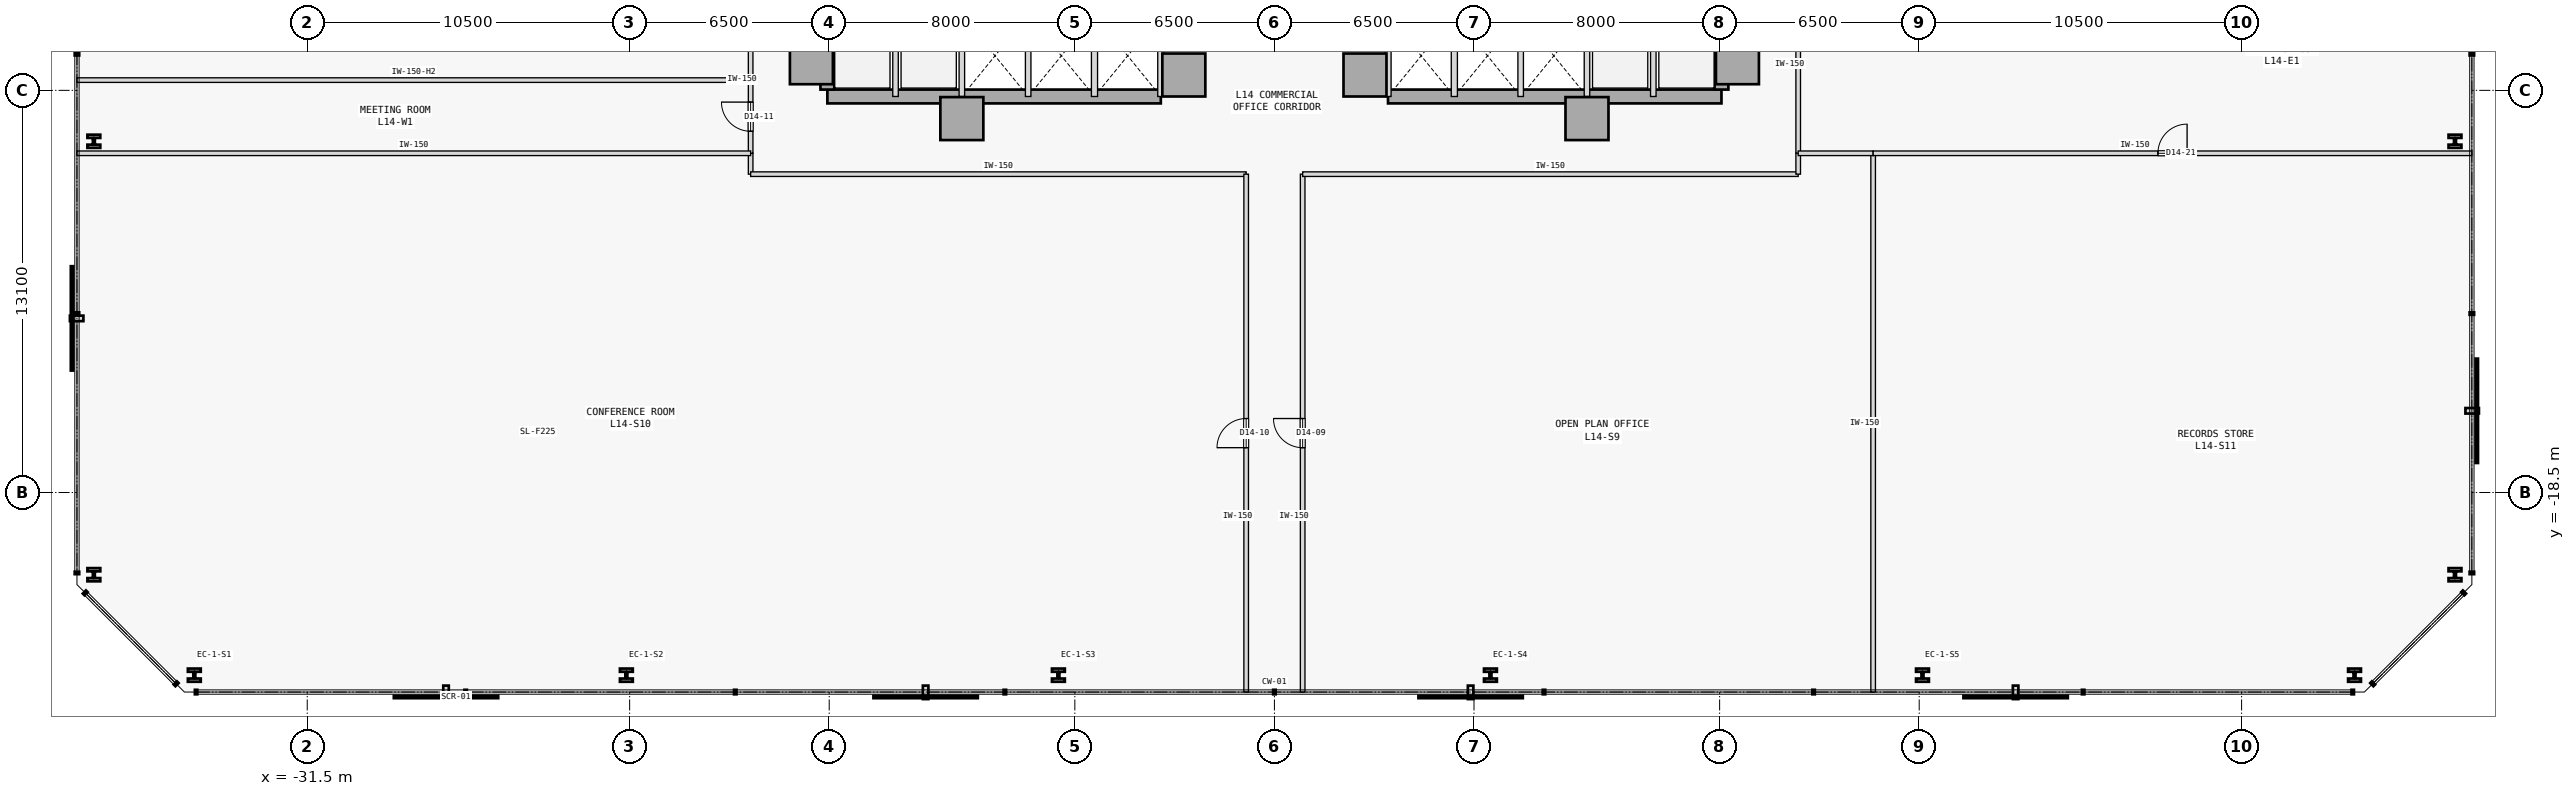
"""IFC4 building model, lengths in metres.
Left out: names, types, materials, properties, quantities, classifications, styles, units other than length and angle.
Written with IfcOpenShell. Run it as: python <this file> out.ifc"""

import sys

from ifc_helpers import new_model, si_unit, direction, frame, frame_2d, origin, origin_2d, place, context, subcontext, project, spatial, rectangle, i_section, extrude, element, fill, save


model = new_model("IFC4")
c1 = context("Model", 3, precision=1e-05, world=origin(), true_north=direction((0.0, 1.0)))
c2 = subcontext(c1, "Body", "Model", "MODEL_VIEW")
j1 = project(units=[si_unit("LENGTHUNIT", "METRE"), si_unit("PLANEANGLEUNIT", "RADIAN")], contexts=[c1])
p1 = place(None, origin())
s1 = spatial("IfcSite", under=j1, at=p1, CompositionType="ELEMENT")
p2 = place(p1, origin())
s2 = spatial("IfcBuilding", under=s1, at=p2, CompositionType="ELEMENT")
p3 = place(p2, frame((0.0, 0.0, 59.8)))
s3 = spatial("IfcBuildingStorey", under=s2, at=p3, CompositionType="ELEMENT", Elevation=59.8)
for number, where, z_axis, x_axis in (
    (1, (-15.08, -4.5, 0.0), (0.0, 0.0, 1.0), (1.0, 0.0, 0.0)),
    (2, (-10.18, -6.32, 0.0), (0.0, 0.0, 1.0), (1.0, 0.0, 0.0)),
    (3, (-2.95, -4.9, 0.0), (0.0, 0.0, 1.0), (1.0, 0.0, 0.0)),
    (4, (15.08, -4.5, 0.0), (0.0, 0.0, 1.0), (1.0, 0.0, 0.0)),
    (5, (10.18, -6.32, 0.0), (0.0, 0.0, 1.0), (1.0, 0.0, 0.0)),
    (6, (2.95, -4.9, 0.0), (0.0, 0.0, 1.0), (1.0, 0.0, 0.0)),
):
    element("IfcColumn", number, at=place(p3, frame(where, z_axis=z_axis, x_axis=x_axis)), inside=s3, PredefinedType="COLUMN", context=c2, shape_type="SweptSolid", body=[
        extrude(rectangle(XDim=1.4, YDim=1.4, at=origin_2d()), origin(), (0.0, 0.0, 1.0), 3.8),
    ])
p4 = place(p3, frame((-14.56, -5.6, 0.0), z_axis=(0.0, 0.0, 1.0), x_axis=(1.0, 0.0, 0.0)))
e7 = element("IfcWall", 7, at=p4, inside=s3, PredefinedType="SHEAR", context=c2, shape_type="SweptSolid", body=[
    extrude(rectangle(XDim=10.86, YDim=0.45, at=frame_2d((5.43, 0.0))), origin(), (0.0, 0.0, 1.0), 3.575),
])
p5 = place(p3, frame((-14.56, -5.375, 0.0), z_axis=(0.0, 0.0, 1.0), x_axis=(0.0, 1.0, 0.0)))
e8 = element("IfcWall", 8, at=p5, inside=s3, PredefinedType="SHEAR", context=c2, shape_type="SweptSolid", body=[
    extrude(rectangle(XDim=10.75, YDim=0.45, at=frame_2d((5.375, 0.0))), origin(), (0.0, 0.0, 1.0), 3.575),
])
p6 = place(p3, frame((3.7, -5.6, 0.0), z_axis=(0.0, 0.0, 1.0), x_axis=(1.0, 0.0, 0.0)))
e9 = element("IfcWall", 9, at=p6, inside=s3, PredefinedType="SHEAR", context=c2, shape_type="SweptSolid", body=[
    extrude(rectangle(XDim=10.86, YDim=0.45, at=frame_2d((5.43, 0.0))), origin(), (0.0, 0.0, 1.0), 3.575),
])
p7 = place(p3, frame((14.56, -5.375, 0.0), z_axis=(0.0, 0.0, 1.0), x_axis=(0.0, 1.0, 0.0)))
e10 = element("IfcWall", 10, at=p7, inside=s3, PredefinedType="SHEAR", context=c2, shape_type="SweptSolid", body=[
    extrude(rectangle(XDim=10.75, YDim=0.45, at=frame_2d((5.375, 0.0))), origin(), (0.0, 0.0, 1.0), 3.575),
])
for number, where, z_axis, x_axis in (
    (11, (-35.178, -24.45, 0.0), (0.0, 0.0, 1.0), (1.0, 0.0, 0.0)),
    (12, (-21.107, -24.45, 0.0), (0.0, 0.0, 1.0), (1.0, 0.0, 0.0)),
    (13, (-7.036, -24.45, 0.0), (0.0, 0.0, 1.0), (1.0, 0.0, 0.0)),
    (14, (7.036, -24.45, 0.0), (0.0, 0.0, 1.0), (1.0, 0.0, 0.0)),
    (15, (21.107, -24.45, 0.0), (0.0, 0.0, 1.0), (1.0, 0.0, 0.0)),
    (16, (35.178, -24.45, 0.0), (0.0, 0.0, 1.0), (1.0, 0.0, 0.0)),
    (17, (38.45, -21.178, 0.0), (0.0, 0.0, 1.0), (1.0, 0.0, 0.0)),
    (18, (38.45, -7.059, 0.0), (0.0, 0.0, 1.0), (1.0, 0.0, 0.0)),
    (19, (-38.45, -7.059, 0.0), (0.0, 0.0, 1.0), (1.0, 0.0, 0.0)),
    (20, (-38.45, -21.178, 0.0), (0.0, 0.0, 1.0), (1.0, 0.0, 0.0)),
):
    element("IfcColumn", number, at=place(p3, frame(where, z_axis=z_axis, x_axis=x_axis)), inside=s3, PredefinedType="COLUMN", context=c2, shape_type="SweptSolid", body=[
        extrude(i_section(OverallWidth=0.42, OverallDepth=0.431, WebThickness=0.065, FlangeThickness=0.106, FilletRadius=0.015, at=origin_2d()), origin(), (0.0, 0.0, 1.0), 3.8),
    ])
for number, where, z_axis, x_axis in (
    (21, (-3.7, -5.6, 0.0), (0.0, 0.0, 1.0), (0.0, 1.0, 0.0)),
    (22, (-5.86, -5.6, 0.0), (0.0, 0.0, 1.0), (0.0, 1.0, 0.0)),
):
    element("IfcWall", number, at=place(p3, frame(where, z_axis=z_axis, x_axis=x_axis)), inside=s3, PredefinedType="STANDARD", context=c2, shape_type="SweptSolid", body=[
        extrude(rectangle(XDim=2.65, YDim=0.2, at=frame_2d((1.325, 0.0))), origin(), (0.0, 0.0, 1.0), 3.575),
    ])
for number, where, z_axis, x_axis in (
    (23, (-12.34, -5.6, 0.0), (0.0, 0.0, 1.0), (0.0, 1.0, 0.0)),
    (24, (-10.18, -5.6, 0.0), (0.0, 0.0, 1.0), (0.0, 1.0, 0.0)),
    (25, (-8.02, -5.6, 0.0), (0.0, 0.0, 1.0), (0.0, 1.0, 0.0)),
):
    element("IfcWall", number, at=place(p3, frame(where, z_axis=z_axis, x_axis=x_axis)), inside=s3, PredefinedType="STANDARD", context=c2, shape_type="SweptSolid", body=[
        extrude(rectangle(XDim=2.65, YDim=0.18, at=frame_2d((1.325, 0.0))), origin(), (0.0, 0.0, 1.0), 3.575),
    ])
for number, where, z_axis, x_axis in (
    (26, (3.7, -5.6, 0.0), (0.0, 0.0, 1.0), (0.0, 1.0, 0.0)),
    (27, (5.86, -5.6, 0.0), (0.0, 0.0, 1.0), (0.0, 1.0, 0.0)),
):
    element("IfcWall", number, at=place(p3, frame(where, z_axis=z_axis, x_axis=x_axis)), inside=s3, PredefinedType="STANDARD", context=c2, shape_type="SweptSolid", body=[
        extrude(rectangle(XDim=2.65, YDim=0.2, at=frame_2d((1.325, 0.0))), origin(), (0.0, 0.0, 1.0), 3.575),
    ])
for number, where, z_axis, x_axis in (
    (28, (12.34, -5.6, 0.0), (0.0, 0.0, 1.0), (0.0, 1.0, 0.0)),
    (29, (10.18, -5.6, 0.0), (0.0, 0.0, 1.0), (0.0, 1.0, 0.0)),
    (30, (8.02, -5.6, 0.0), (0.0, 0.0, 1.0), (0.0, 1.0, 0.0)),
):
    element("IfcWall", number, at=place(p3, frame(where, z_axis=z_axis, x_axis=x_axis)), inside=s3, PredefinedType="STANDARD", context=c2, shape_type="SweptSolid", body=[
        extrude(rectangle(XDim=2.65, YDim=0.18, at=frame_2d((1.325, 0.0))), origin(), (0.0, 0.0, 1.0), 3.575),
    ])
p8 = place(p3, frame((0.92, -25.0, 0.0), z_axis=(0.0, 0.0, 1.0), x_axis=(0.0, 1.0, 0.0)))
e31 = element("IfcWall", 31, at=p8, inside=s3, PredefinedType="PARTITIONING", context=c2, shape_type="SweptSolid", body=[
    extrude(rectangle(XDim=16.87, YDim=0.15, at=frame_2d((8.435, 0.0))), origin(), (0.0, 0.0, 1.0), 3.575),
])
p9 = place(p8, frame((7.96, 0.0, 0.0)))
e32 = element("IfcOpeningElement", 32, at=p9, cuts=e31, PredefinedType="OPENING", context=c2, shape_type="SweptSolid", body=[
    extrude(rectangle(XDim=0.95, YDim=2.15, at=frame_2d((0.475, 1.075))), frame((0.0, 0.085, 0.0), z_axis=(0.0, -1.0, 0.0), x_axis=(1.0, 0.0, 0.0)), (0.0, 0.0, 1.0), 0.17),
])
p10 = place(p3, frame((0.92, -8.13, 0.0), z_axis=(0.0, 0.0, 1.0), x_axis=(1.0, 0.0, 0.0)))
e33 = element("IfcWall", 33, at=p10, inside=s3, PredefinedType="PARTITIONING", context=c2, shape_type="SweptSolid", body=[
    extrude(rectangle(XDim=16.139, YDim=0.15, at=frame_2d((8.07, 0.0))), origin(), (0.0, 0.0, 1.0), 3.575),
])
for number, where, z_axis, x_axis in (
    (34, (17.059, -8.13, 0.0), (0.0, 0.0, 1.0), (0.0, 1.0, 0.0)),
    (35, (-17.059, -8.13, 0.0), (0.0, 0.0, 1.0), (0.0, 1.0, 0.0)),
):
    element("IfcWall", number, at=place(p3, frame(where, z_axis=z_axis, x_axis=x_axis)), inside=s3, PredefinedType="PARTITIONING", context=c2, shape_type="SweptSolid", body=[
        extrude(rectangle(XDim=0.68, YDim=0.15, at=frame_2d((0.34, 0.0))), origin(), (0.0, 0.0, 1.0), 3.575),
    ])
p11 = place(p3, frame((-17.059, -8.13, 0.0), z_axis=(0.0, 0.0, 1.0), x_axis=(1.0, 0.0, 0.0)))
e36 = element("IfcWall", 36, at=p11, inside=s3, PredefinedType="PARTITIONING", context=c2, shape_type="SweptSolid", body=[
    extrude(rectangle(XDim=16.139, YDim=0.15, at=frame_2d((8.07, 0.0))), origin(), (0.0, 0.0, 1.0), 3.575),
])
p12 = place(p3, frame((-0.92, -25.0, 0.0), z_axis=(0.0, 0.0, 1.0), x_axis=(0.0, 1.0, 0.0)))
e37 = element("IfcWall", 37, at=p12, inside=s3, PredefinedType="PARTITIONING", context=c2, shape_type="SweptSolid", body=[
    extrude(rectangle(XDim=16.87, YDim=0.15, at=frame_2d((8.435, 0.0))), origin(), (0.0, 0.0, 1.0), 3.575),
])
p13 = place(p12, frame((7.96, 0.0, 0.0)))
e38 = element("IfcOpeningElement", 38, at=p13, cuts=e37, PredefinedType="OPENING", context=c2, shape_type="SweptSolid", body=[
    extrude(rectangle(XDim=0.95, YDim=2.15, at=frame_2d((0.475, 1.075))), frame((0.0, 0.085, 0.0), z_axis=(0.0, -1.0, 0.0), x_axis=(1.0, 0.0, 0.0)), (0.0, 0.0, 1.0), 0.17),
])
p14 = place(p3, frame((-17.059, -7.45, 0.0), z_axis=(0.0, 0.0, 1.0), x_axis=(0.0, 1.0, 0.0)))
e39 = element("IfcWall", 39, at=p14, inside=s3, PredefinedType="PARTITIONING", context=c2, shape_type="SweptSolid", body=[
    extrude(rectangle(XDim=2.384, YDim=0.15, at=frame_2d((1.192, 0.0))), origin(), (0.0, 0.0, 1.0), 3.575),
])
p15 = place(p14, frame((0.717, 0.0, 0.0)))
e40 = element("IfcOpeningElement", 40, at=p15, cuts=e39, PredefinedType="OPENING", context=c2, shape_type="SweptSolid", body=[
    extrude(rectangle(XDim=0.95, YDim=2.15, at=frame_2d((0.475, 1.075))), frame((0.0, 0.085, 0.0), z_axis=(0.0, -1.0, 0.0), x_axis=(1.0, 0.0, 0.0)), (0.0, 0.0, 1.0), 0.17),
])
p16 = place(p3, frame((-17.059, -5.066, 0.0), z_axis=(0.0, 0.0, 1.0), x_axis=(0.0, 1.0, 0.0)))
e41 = element("IfcWall", 41, at=p16, inside=s3, PredefinedType="PARTITIONING", context=c2, shape_type="SweptSolid", body=[
    extrude(rectangle(XDim=3.129, YDim=0.15, at=frame_2d((1.564, 0.0))), origin(), (0.0, 0.0, 1.0), 3.575),
])
p17 = place(p16, frame((1.559, 0.0, 0.0)))
e42 = element("IfcOpeningElement", 42, at=p17, cuts=e41, PredefinedType="OPENING", context=c2, shape_type="SweptSolid", body=[
    extrude(rectangle(XDim=0.95, YDim=2.15, at=frame_2d((0.475, 1.075))), frame((0.0, 0.085, 0.0), z_axis=(0.0, -1.0, 0.0), x_axis=(1.0, 0.0, 0.0)), (0.0, 0.0, 1.0), 0.17),
])
p18 = place(p3, frame((17.059, -7.45, 0.0), z_axis=(0.0, 0.0, 1.0), x_axis=(0.0, 1.0, 0.0)))
e43 = element("IfcWall", 43, at=p18, inside=s3, PredefinedType="PARTITIONING", context=c2, shape_type="SweptSolid", body=[
    extrude(rectangle(XDim=6.53, YDim=0.15, at=frame_2d((3.265, 0.0))), origin(), (0.0, 0.0, 1.0), 3.575),
])
p19 = place(p3, frame((19.5, -25.0, 0.0), z_axis=(0.0, 0.0, 1.0), x_axis=(0.0, 1.0, 0.0)))
e44 = element("IfcWall", 44, at=p19, inside=s3, PredefinedType="PARTITIONING", context=c2, shape_type="SweptSolid", body=[
    extrude(rectangle(XDim=17.55, YDim=0.15, at=frame_2d((8.775, 0.0))), origin(), (0.0, 0.0, 1.0), 3.575),
])
p20 = place(p3, frame((17.059, -7.45, 0.0), z_axis=(0.0, 0.0, 1.0), x_axis=(1.0, 0.0, 0.0)))
e45 = element("IfcWall", 45, at=p20, inside=s3, PredefinedType="PARTITIONING", context=c2, shape_type="SweptSolid", body=[
    extrude(rectangle(XDim=2.441, YDim=0.15, at=frame_2d((1.22, 0.0))), origin(), (0.0, 0.0, 1.0), 3.575),
])
p21 = place(p3, frame((-39.0, -7.45, 0.0), z_axis=(0.0, 0.0, 1.0), x_axis=(1.0, 0.0, 0.0)))
e46 = element("IfcWall", 46, at=p21, inside=s3, PredefinedType="PARTITIONING", context=c2, shape_type="SweptSolid", body=[
    extrude(rectangle(XDim=21.941, YDim=0.15, at=frame_2d((10.97, 0.0))), origin(), (0.0, 0.0, 1.0), 3.575),
])
p22 = place(p3, frame((19.5, -7.45, 0.0), z_axis=(0.0, 0.0, 1.0), x_axis=(1.0, 0.0, 0.0)))
e47 = element("IfcWall", 47, at=p22, inside=s3, PredefinedType="PARTITIONING", context=c2, shape_type="SweptSolid", body=[
    extrude(rectangle(XDim=19.5, YDim=0.15, at=frame_2d((9.75, 0.0))), origin(), (0.0, 0.0, 1.0), 3.575),
])
p23 = place(p22, frame((9.275, 0.0, 0.0)))
e48 = element("IfcOpeningElement", 48, at=p23, cuts=e47, PredefinedType="OPENING", context=c2, shape_type="SweptSolid", body=[
    extrude(rectangle(XDim=0.95, YDim=2.15, at=frame_2d((0.475, 1.075))), frame((0.0, 0.085, 0.0), z_axis=(0.0, -1.0, 0.0), x_axis=(1.0, 0.0, 0.0)), (0.0, 0.0, 1.0), 0.17),
])
p24 = place(p3, frame((-39.0, -5.066, 0.0), z_axis=(0.0, 0.0, 1.0), x_axis=(1.0, 0.0, 0.0)))
e49 = element("IfcWall", 49, at=p24, inside=s3, PredefinedType="PARTITIONING", context=c2, shape_type="SweptSolid", body=[
    extrude(rectangle(XDim=21.941, YDim=0.15, at=frame_2d((10.97, 0.0))), origin(), (0.0, 0.0, 1.0), 2.975),
])
p25 = place(p9, origin())
e50 = element("IfcDoor", 50, at=p25, inside=s3, OperationType="SINGLE_SWING_RIGHT", PredefinedType="DOOR", context=c2, shape_type="SweptSolid", body=[
    extrude(rectangle(XDim=0.95, YDim=2.15, at=frame_2d((0.475, 1.075))), frame((0.0, 0.025, 0.0), z_axis=(0.0, -1.0, 0.0), x_axis=(1.0, 0.0, 0.0)), (0.0, 0.0, 1.0), 0.05),
])
fill(e32, e50)
p26 = place(p13, origin())
e51 = element("IfcDoor", 51, at=p26, inside=s3, OperationType="SINGLE_SWING_LEFT", PredefinedType="DOOR", context=c2, shape_type="SweptSolid", body=[
    extrude(rectangle(XDim=0.95, YDim=2.15, at=frame_2d((0.475, 1.075))), frame((0.0, 0.025, 0.0), z_axis=(0.0, -1.0, 0.0), x_axis=(1.0, 0.0, 0.0)), (0.0, 0.0, 1.0), 0.05),
])
fill(e38, e51)
p27 = place(p15, origin())
e52 = element("IfcDoor", 52, at=p27, inside=s3, OperationType="SINGLE_SWING_RIGHT", PredefinedType="DOOR", context=c2, shape_type="SweptSolid", body=[
    extrude(rectangle(XDim=0.95, YDim=2.15, at=frame_2d((0.475, 1.075))), frame((0.0, 0.025, 0.0), z_axis=(0.0, -1.0, 0.0), x_axis=(1.0, 0.0, 0.0)), (0.0, 0.0, 1.0), 0.05),
])
fill(e40, e52)
p28 = place(p23, origin())
e53 = element("IfcDoor", 53, at=p28, inside=s3, OperationType="SINGLE_SWING_RIGHT", PredefinedType="DOOR", context=c2, shape_type="SweptSolid", body=[
    extrude(rectangle(XDim=0.95, YDim=2.15, at=frame_2d((0.475, 1.075))), frame((0.0, 0.025, 0.0), z_axis=(0.0, -1.0, 0.0), x_axis=(1.0, 0.0, 0.0)), (0.0, 0.0, 1.0), 0.05),
])
fill(e48, e53)
save(model, sys.argv[1])
